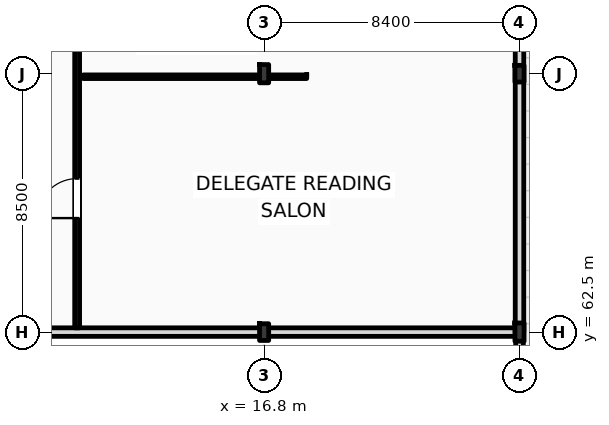
"""IFC4 building model, lengths in metres.
Left out: names, types, materials, properties, quantities, classifications, styles, units other than length and angle.
Written with IfcOpenShell. Run it as: python <this file> out.ifc"""

import sys

from ifc_helpers import new_model, si_unit, direction, frame, frame_2d, origin, origin_2d, place, context, subcontext, project, spatial, rectangle, i_section, extrude, element, fill, save


model = new_model("IFC4")
c1 = context("Model", 3, precision=1e-05, world=origin(), true_north=direction((0.0, 1.0)))
c2 = subcontext(c1, "Body", "Model", "MODEL_VIEW")
j1 = project(units=[si_unit("LENGTHUNIT", "METRE"), si_unit("PLANEANGLEUNIT", "RADIAN")], contexts=[c1])
p1 = place(None, origin())
s1 = spatial("IfcSite", under=j1, at=p1, CompositionType="ELEMENT")
p2 = place(p1, origin())
s2 = spatial("IfcBuilding", under=s1, at=p2, CompositionType="ELEMENT")
p3 = place(p2, frame((0.0, 0.0, 16.2)))
s3 = spatial("IfcBuildingStorey", under=s2, at=p3, CompositionType="ELEMENT", Elevation=16.2)
p4 = place(p3, frame((16.8, 62.5, 0.0), z_axis=(0.0, 0.0, 1.0), x_axis=(1.0, 0.0, 0.0)))
e1 = element("IfcColumn", 1, at=p4, inside=s3, PredefinedType="COLUMN", context=c2, shape_type="SweptSolid", body=[
    extrude(i_section(OverallWidth=0.3, OverallDepth=0.55, WebThickness=0.015, FlangeThickness=0.029, FilletRadius=0.027, at=origin_2d()), origin(), (0.0, 0.0, 1.0), 4.2),
])
for number, where, z_axis, x_axis in (
    (2, (16.8, 71.0, 0.0), (0.0, 0.0, 1.0), (1.0, 0.0, 0.0)),
    (3, (25.2, 62.5, 0.0), (0.0, 0.0, 1.0), (1.0, 0.0, 0.0)),
):
    element("IfcColumn", number, at=place(p3, frame(where, z_axis=z_axis, x_axis=x_axis)), inside=s3, PredefinedType="COLUMN", context=c2, shape_type="SweptSolid", body=[
        extrude(i_section(OverallWidth=0.3, OverallDepth=0.6, WebThickness=0.015, FlangeThickness=0.03, FilletRadius=0.027, at=origin_2d()), origin(), (0.0, 0.0, 1.0), 4.2),
    ])
p5 = place(p3, frame((25.2, 71.0, 0.0), z_axis=(0.0, 0.0, 1.0), x_axis=(1.0, 0.0, 0.0)))
e4 = element("IfcColumn", 4, at=p5, inside=s3, PredefinedType="COLUMN", context=c2, shape_type="SweptSolid", body=[
    extrude(i_section(OverallWidth=0.3, OverallDepth=0.55, WebThickness=0.015, FlangeThickness=0.029, FilletRadius=0.027, at=origin_2d()), origin(), (0.0, 0.0, 1.0), 4.2),
])
p6 = place(p3, frame((0.0, 62.5, 0.0), z_axis=(0.0, 0.0, 1.0), x_axis=(1.0, 0.0, 0.0)))
e5 = element("IfcWall", 5, at=p6, inside=s3, PredefinedType="STANDARD", context=c2, shape_type="SweptSolid", body=[
    extrude(rectangle(XDim=25.2, YDim=0.28, at=frame_2d((12.6, 0.0))), origin(), (0.0, 0.0, 1.0), 3.36),
])
p7 = place(p3, frame((25.2, 62.5, 0.0), z_axis=(0.0, 0.0, 1.0), x_axis=(0.0, 1.0, 0.0)))
e6 = element("IfcWall", 6, at=p7, inside=s3, PredefinedType="STANDARD", context=c2, shape_type="SweptSolid", body=[
    extrude(rectangle(XDim=17.0, YDim=0.28, at=frame_2d((8.5, 0.0))), origin(), (0.0, 0.0, 1.0), 3.51),
])
p8 = place(p3, frame((25.2, 54.0, 0.0), z_axis=(0.0, 0.0, 1.0), x_axis=(0.0, 1.0, 0.0)))
e7 = element("IfcWall", 7, at=p8, inside=s3, PredefinedType="PARAPET", context=c2, shape_type="SweptSolid", body=[
    extrude(rectangle(XDim=8.5, YDim=0.25, at=frame_2d((4.25, 0.0))), origin(), (0.0, 0.0, 1.0), 1.15),
])
p9 = place(p3, frame((10.65, 62.64, 0.0), z_axis=(0.0, 0.0, 1.0), x_axis=(0.0, 1.0, 0.0)))
e8 = element("IfcWall", 8, at=p9, inside=s3, PredefinedType="PARTITIONING", context=c2, shape_type="SweptSolid", body=[
    extrude(rectangle(XDim=16.31, YDim=0.16, at=frame_2d((8.155, 0.0))), origin(), (0.0, 0.0, 1.0), 3.92),
])
p10 = place(p9, frame((3.61, 0.0, 0.0)))
e9 = element("IfcOpeningElement", 9, at=p10, cuts=e8, PredefinedType="OPENING", context=c2, shape_type="SweptSolid", body=[
    extrude(rectangle(XDim=1.3, YDim=2.2, at=frame_2d((0.65, 1.1))), frame((0.0, 0.09, 0.0), z_axis=(0.0, -1.0, 0.0), x_axis=(1.0, 0.0, 0.0)), (0.0, 0.0, 1.0), 0.18),
])
p11 = place(p9, frame((9.735, 0.0, 0.0)))
e10 = element("IfcOpeningElement", 10, at=p11, cuts=e8, PredefinedType="OPENING", context=c2, shape_type="SweptSolid", body=[
    extrude(rectangle(XDim=1.05, YDim=2.12, at=frame_2d((0.525, 1.06))), frame((0.0, 0.09, 0.0), z_axis=(0.0, -1.0, 0.0), x_axis=(1.0, 0.0, 0.0)), (0.0, 0.0, 1.0), 0.18),
])
p12 = place(p9, frame((13.49, 0.0, 0.0)))
e11 = element("IfcOpeningElement", 11, at=p12, cuts=e8, PredefinedType="OPENING", context=c2, shape_type="SweptSolid", body=[
    extrude(rectangle(XDim=0.94, YDim=2.15, at=frame_2d((0.47, 1.075))), frame((0.0, 0.09, 0.0), z_axis=(0.0, -1.0, 0.0), x_axis=(1.0, 0.0, 0.0)), (0.0, 0.0, 1.0), 0.18),
])
p13 = place(p3, frame((10.85, 70.9, 0.0), z_axis=(0.0, 0.0, 1.0), x_axis=(1.0, 0.0, 0.0)))
e12 = element("IfcWall", 12, at=p13, inside=s3, PredefinedType="PARTITIONING", context=c2, shape_type="SweptSolid", body=[
    extrude(rectangle(XDim=7.35, YDim=0.12, at=frame_2d((3.675, 0.0))), origin(), (0.0, 0.0, 1.0), 3.36),
])
p14 = place(p10, origin())
e13 = element("IfcDoor", 13, at=p14, inside=s3, OperationType="SINGLE_SWING_LEFT", PredefinedType="DOOR", context=c2, shape_type="SweptSolid", body=[
    extrude(rectangle(XDim=1.3, YDim=2.2, at=frame_2d((0.65, 1.1))), frame((0.0, 0.025, 0.0), z_axis=(0.0, -1.0, 0.0), x_axis=(1.0, 0.0, 0.0)), (0.0, 0.0, 1.0), 0.05),
])
fill(e9, e13)
save(model, sys.argv[1])
